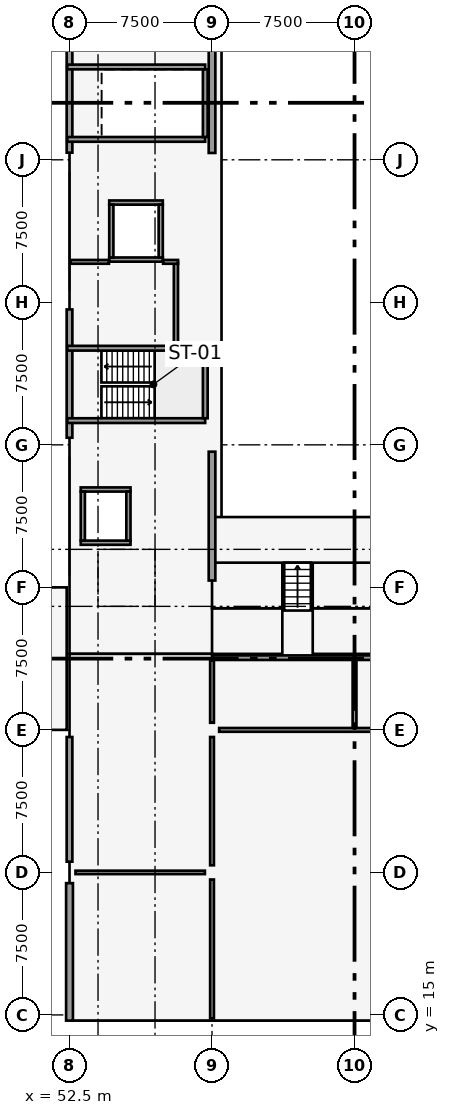
"""IFC4 building model, lengths in metres.
Left out: names, types, materials, properties, quantities, classifications, styles, units other than length and angle.
Written with IfcOpenShell. Run it as: python <this file> out.ifc"""

import sys

from ifc_helpers import new_model, si_unit, direction, frame, frame_2d, origin, origin_2d, place, context, subcontext, project, spatial, rectangle, extrude, element, fill, save


model = new_model("IFC4")
c1 = context("Model", 3, precision=1e-05, world=origin(), true_north=direction((0.0, 1.0)))
c2 = subcontext(c1, "Body", "Model", "MODEL_VIEW")
j1 = project(units=[si_unit("LENGTHUNIT", "METRE"), si_unit("PLANEANGLEUNIT", "RADIAN")], contexts=[c1])
p1 = place(None, origin())
s1 = spatial("IfcSite", under=j1, at=p1, CompositionType="ELEMENT")
p2 = place(p1, origin())
s2 = spatial("IfcBuilding", under=s1, at=p2, CompositionType="ELEMENT")
p3 = place(p2, frame((0.0, 0.0, 13.2)))
s3 = spatial("IfcBuildingStorey", under=s2, at=p3, CompositionType="ELEMENT", Elevation=13.2)
p4 = place(p3, frame((52.5, 22.5, 0.0), z_axis=(0.0, 0.0, 1.0), x_axis=(1.0, 0.0, 0.0)))
e1 = element("IfcColumn", 1, at=p4, inside=s3, PredefinedType="COLUMN", context=c2, shape_type="SweptSolid", body=[
    extrude(rectangle(XDim=0.6, YDim=1.1, at=origin_2d()), origin(), (0.0, 0.0, 1.0), 3.9),
])
for number, where, z_axis, x_axis in (
    (2, (52.5, 30.0, 0.0), (0.0, 0.0, 1.0), (1.0, 0.0, 0.0)),
    (3, (52.5, 37.5, 0.0), (0.0, 0.0, 1.0), (1.0, 0.0, 0.0)),
    (4, (52.5, 45.0, 0.0), (0.0, 0.0, 1.0), (1.0, 0.0, 0.0)),
    (5, (52.5, 52.5, 0.0), (0.0, 0.0, 1.0), (1.0, 0.0, 0.0)),
    (6, (52.5, 60.0, 0.0), (0.0, 0.0, 1.0), (1.0, 0.0, 0.0)),
    (7, (60.0, 22.5, 0.0), (0.0, 0.0, 1.0), (1.0, 0.0, 0.0)),
    (8, (60.0, 30.0, 0.0), (0.0, 0.0, 1.0), (1.0, 0.0, 0.0)),
    (9, (60.0, 37.5, 0.0), (0.0, 0.0, 1.0), (1.0, 0.0, 0.0)),
    (10, (60.0, 45.0, 0.0), (0.0, 0.0, 1.0), (1.0, 0.0, 0.0)),
    (11, (60.0, 52.5, 0.0), (0.0, 0.0, 1.0), (1.0, 0.0, 0.0)),
    (12, (60.0, 60.0, 0.0), (0.0, 0.0, 1.0), (1.0, 0.0, 0.0)),
):
    element("IfcColumn", number, at=place(p3, frame(where, z_axis=z_axis, x_axis=x_axis)), inside=s3, PredefinedType="COLUMN", context=c2, shape_type="SweptSolid", body=[
        extrude(rectangle(XDim=0.72, YDim=0.72, at=origin_2d()), origin(), (0.0, 0.0, 1.0), 3.9),
    ])
p5 = place(p3, frame((60.0, 37.86, 0.0), z_axis=(0.0, 0.0, 1.0), x_axis=(0.0, 1.0, 0.0)))
e13 = element("IfcWall", 13, at=p5, inside=s3, PredefinedType="SHEAR", context=c2, shape_type="SweptSolid", body=[
    extrude(rectangle(XDim=6.78, YDim=0.35, at=frame_2d((3.39, 0.0))), origin(), (0.0, 0.0, 1.0), 2.42),
])
p6 = place(p3, frame((60.0, 60.36, 0.0), z_axis=(0.0, 0.0, 1.0), x_axis=(0.0, 1.0, 0.0)))
e14 = element("IfcWall", 14, at=p6, inside=s3, PredefinedType="SHEAR", context=c2, shape_type="SweptSolid", body=[
    extrude(rectangle(XDim=6.78, YDim=0.35, at=frame_2d((3.39, 0.0))), origin(), (0.0, 0.0, 1.0), 2.57),
])
p7 = place(p3, frame((52.5, 14.7, 0.0), z_axis=(0.0, 0.0, 1.0), x_axis=(0.0, 1.0, 0.0)))
e15 = element("IfcWall", 15, at=p7, inside=s3, PredefinedType="SOLIDWALL", context=c2, shape_type="SweptSolid", body=[
    extrude(rectangle(XDim=7.235, YDim=0.36, at=frame_2d((3.618, 0.0))), origin(), (0.0, 0.0, 1.0), 2.39),
])
p8 = place(p3, frame((52.5, 23.065, 0.0), z_axis=(0.0, 0.0, 1.0), x_axis=(0.0, 1.0, 0.0)))
e16 = element("IfcWall", 16, at=p8, inside=s3, PredefinedType="SOLIDWALL", context=c2, shape_type="SweptSolid", body=[
    extrude(rectangle(XDim=6.56, YDim=0.3, at=frame_2d((3.28, 0.0))), origin(), (0.0, 0.0, 1.0), 2.39),
])
p9 = place(p3, frame((52.5, 45.375, 0.0), z_axis=(0.0, 0.0, 1.0), x_axis=(0.0, 1.0, 0.0)))
e17 = element("IfcWall", 17, at=p9, inside=s3, PredefinedType="SOLIDWALL", context=c2, shape_type="SweptSolid", body=[
    extrude(rectangle(XDim=6.75, YDim=0.3, at=frame_2d((3.375, 0.0))), origin(), (0.0, 0.0, 1.0), 2.64),
])
p10 = place(p3, frame((52.5, 60.375, 0.0), z_axis=(0.0, 0.0, 1.0), x_axis=(0.0, 1.0, 0.0)))
e18 = element("IfcWall", 18, at=p10, inside=s3, PredefinedType="SOLIDWALL", context=c2, shape_type="SweptSolid", body=[
    extrude(rectangle(XDim=6.75, YDim=0.3, at=frame_2d((3.375, 0.0))), origin(), (0.0, 0.0, 1.0), 2.54),
])
p11 = place(p3, frame((52.38, 46.275, 0.0), z_axis=(0.0, 0.0, 1.0), x_axis=(1.0, 0.0, 0.0)))
e19 = element("IfcWall", 19, at=p11, inside=s3, PredefinedType="SOLIDWALL", context=c2, shape_type="SweptSolid", body=[
    extrude(rectangle(XDim=7.26, YDim=0.25, at=frame_2d((3.63, 0.0))), origin(), (0.0, 0.0, 1.0), 3.62),
])
p12 = place(p11, frame((0.62, 0.0, 0.0)))
e20 = element("IfcOpeningElement", 20, at=p12, cuts=e19, PredefinedType="OPENING", context=c2, shape_type="SweptSolid", body=[
    extrude(rectangle(XDim=1.1, YDim=2.15, at=frame_2d((0.55, 1.075))), frame((0.0, 0.135, 0.0), z_axis=(0.0, -1.0, 0.0), x_axis=(1.0, 0.0, 0.0)), (0.0, 0.0, 1.0), 0.27),
])
p13 = place(p3, frame((52.38, 50.085, 0.0), z_axis=(0.0, 0.0, 1.0), x_axis=(1.0, 0.0, 0.0)))
e21 = element("IfcWall", 21, at=p13, inside=s3, PredefinedType="SOLIDWALL", context=c2, shape_type="SweptSolid", body=[
    extrude(rectangle(XDim=7.26, YDim=0.25, at=frame_2d((3.63, 0.0))), origin(), (0.0, 0.0, 1.0), 3.62),
])
p14 = place(p13, frame((0.62, 0.0, 0.0)))
e22 = element("IfcOpeningElement", 22, at=p14, cuts=e21, PredefinedType="OPENING", context=c2, shape_type="SweptSolid", body=[
    extrude(rectangle(XDim=1.1, YDim=2.15, at=frame_2d((0.55, 1.075))), frame((0.0, 0.135, 0.0), z_axis=(0.0, -1.0, 0.0), x_axis=(1.0, 0.0, 0.0)), (0.0, 0.0, 1.0), 0.27),
])
p15 = place(p3, frame((59.645, 46.4, 0.0), z_axis=(0.0, 0.0, 1.0), x_axis=(0.0, 1.0, 0.0)))
e23 = element("IfcWall", 23, at=p15, inside=s3, PredefinedType="SOLIDWALL", context=c2, shape_type="SweptSolid", body=[
    extrude(rectangle(XDim=3.56, YDim=0.25, at=frame_2d((1.78, 0.0))), origin(), (0.0, 0.0, 1.0), 3.62),
])
p16 = place(p3, frame((52.38, 61.075, 0.0), z_axis=(0.0, 0.0, 1.0), x_axis=(1.0, 0.0, 0.0)))
e24 = element("IfcWall", 24, at=p16, inside=s3, PredefinedType="SOLIDWALL", context=c2, shape_type="SweptSolid", body=[
    extrude(rectangle(XDim=7.26, YDim=0.25, at=frame_2d((3.63, 0.0))), origin(), (0.0, 0.0, 1.0), 3.62),
])
p17 = place(p16, frame((0.62, 0.0, 0.0)))
e25 = element("IfcOpeningElement", 25, at=p17, cuts=e24, PredefinedType="OPENING", context=c2, shape_type="SweptSolid", body=[
    extrude(rectangle(XDim=1.1, YDim=2.15, at=frame_2d((0.55, 1.075))), frame((0.0, 0.135, 0.0), z_axis=(0.0, -1.0, 0.0), x_axis=(1.0, 0.0, 0.0)), (0.0, 0.0, 1.0), 0.27),
])
p18 = place(p3, frame((52.38, 64.885, 0.0), z_axis=(0.0, 0.0, 1.0), x_axis=(1.0, 0.0, 0.0)))
e26 = element("IfcWall", 26, at=p18, inside=s3, PredefinedType="SOLIDWALL", context=c2, shape_type="SweptSolid", body=[
    extrude(rectangle(XDim=7.26, YDim=0.25, at=frame_2d((3.63, 0.0))), origin(), (0.0, 0.0, 1.0), 3.62),
])
p19 = place(p18, frame((0.62, 0.0, 0.0)))
e27 = element("IfcOpeningElement", 27, at=p19, cuts=e26, PredefinedType="OPENING", context=c2, shape_type="SweptSolid", body=[
    extrude(rectangle(XDim=1.1, YDim=2.15, at=frame_2d((0.55, 1.075))), frame((0.0, 0.135, 0.0), z_axis=(0.0, -1.0, 0.0), x_axis=(1.0, 0.0, 0.0)), (0.0, 0.0, 1.0), 0.27),
])
p20 = place(p3, frame((59.645, 61.2, 0.0), z_axis=(0.0, 0.0, 1.0), x_axis=(0.0, 1.0, 0.0)))
e28 = element("IfcWall", 28, at=p20, inside=s3, PredefinedType="SOLIDWALL", context=c2, shape_type="SweptSolid", body=[
    extrude(rectangle(XDim=3.56, YDim=0.25, at=frame_2d((1.78, 0.0))), origin(), (0.0, 0.0, 1.0), 3.62),
])
for number, where, z_axis, x_axis in (
    (29, (53.09, 39.85, 0.0), (0.0, 0.0, 1.0), (1.0, 0.0, 0.0)),
    (30, (53.09, 42.65, 0.0), (0.0, 0.0, 1.0), (1.0, 0.0, 0.0)),
):
    element("IfcWall", number, at=place(p3, frame(where, z_axis=z_axis, x_axis=x_axis)), inside=s3, PredefinedType="SOLIDWALL", context=c2, shape_type="SweptSolid", body=[
        extrude(rectangle(XDim=2.62, YDim=0.22, at=frame_2d((1.31, 0.0))), origin(), (0.0, 0.0, 1.0), 3.62),
    ])
p21 = place(p3, frame((53.2, 39.96, 0.0), z_axis=(0.0, 0.0, 1.0), x_axis=(0.0, 1.0, 0.0)))
e31 = element("IfcWall", 31, at=p21, inside=s3, PredefinedType="SOLIDWALL", context=c2, shape_type="SweptSolid", body=[
    extrude(rectangle(XDim=2.58, YDim=0.22, at=frame_2d((1.29, 0.0))), origin(), (0.0, 0.0, 1.0), 3.62),
])
p22 = place(p3, frame((55.6, 39.96, 0.0), z_axis=(0.0, 0.0, 1.0), x_axis=(0.0, 1.0, 0.0)))
e32 = element("IfcWall", 32, at=p22, inside=s3, PredefinedType="SOLIDWALL", context=c2, shape_type="SweptSolid", body=[
    extrude(rectangle(XDim=2.58, YDim=0.22, at=frame_2d((1.29, 0.0))), origin(), (0.0, 0.0, 1.0), 3.62),
])
p23 = place(p22, frame((0.79, 0.0, 0.0)))
e33 = element("IfcOpeningElement", 33, at=p23, cuts=e32, PredefinedType="OPENING", context=c2, shape_type="SweptSolid", body=[
    extrude(rectangle(XDim=1.0, YDim=2.15, at=frame_2d((0.5, 1.075))), frame((0.0, 0.12, 0.0), z_axis=(0.0, -1.0, 0.0), x_axis=(1.0, 0.0, 0.0)), (0.0, 0.0, 1.0), 0.24),
])
p24 = place(p3, frame((54.59, 54.75, 0.0), z_axis=(0.0, 0.0, 1.0), x_axis=(1.0, 0.0, 0.0)))
e34 = element("IfcWall", 34, at=p24, inside=s3, PredefinedType="SOLIDWALL", context=c2, shape_type="SweptSolid", body=[
    extrude(rectangle(XDim=2.82, YDim=0.22, at=frame_2d((1.41, 0.0))), origin(), (0.0, 0.0, 1.0), 3.62),
])
p25 = place(p24, frame((0.86, 0.0, 0.0)))
e35 = element("IfcOpeningElement", 35, at=p25, cuts=e34, PredefinedType="OPENING", context=c2, shape_type="SweptSolid", body=[
    extrude(rectangle(XDim=1.1, YDim=2.15, at=frame_2d((0.55, 1.075))), frame((0.0, 0.12, 0.0), z_axis=(0.0, -1.0, 0.0), x_axis=(1.0, 0.0, 0.0)), (0.0, 0.0, 1.0), 0.24),
])
p26 = place(p3, frame((54.59, 57.75, 0.0), z_axis=(0.0, 0.0, 1.0), x_axis=(1.0, 0.0, 0.0)))
e36 = element("IfcWall", 36, at=p26, inside=s3, PredefinedType="SOLIDWALL", context=c2, shape_type="SweptSolid", body=[
    extrude(rectangle(XDim=2.82, YDim=0.22, at=frame_2d((1.41, 0.0))), origin(), (0.0, 0.0, 1.0), 3.62),
])
for number, where, z_axis, x_axis in (
    (37, (54.7, 54.86, 0.0), (0.0, 0.0, 1.0), (0.0, 1.0, 0.0)),
    (38, (57.3, 54.86, 0.0), (0.0, 0.0, 1.0), (0.0, 1.0, 0.0)),
):
    element("IfcWall", number, at=place(p3, frame(where, z_axis=z_axis, x_axis=x_axis)), inside=s3, PredefinedType="SOLIDWALL", context=c2, shape_type="SweptSolid", body=[
        extrude(rectangle(XDim=2.78, YDim=0.22, at=frame_2d((1.39, 0.0))), origin(), (0.0, 0.0, 1.0), 3.62),
    ])
p27 = place(p3, frame((58.1, 50.22, 0.0), z_axis=(0.0, 0.0, 1.0), x_axis=(0.0, 1.0, 0.0)))
e39 = element("IfcWall", 39, at=p27, inside=s3, PredefinedType="SOLIDWALL", context=c2, shape_type="SweptSolid", body=[
    extrude(rectangle(XDim=4.41, YDim=0.22, at=frame_2d((2.205, 0.0))), origin(), (0.0, 0.0, 1.0), 3.62),
])
p28 = place(p27, frame((0.45, 0.0, 0.0)))
e40 = element("IfcOpeningElement", 40, at=p28, cuts=e39, PredefinedType="OPENING", context=c2, shape_type="SweptSolid", body=[
    extrude(rectangle(XDim=1.1, YDim=2.15, at=frame_2d((0.55, 1.075))), frame((0.0, 0.12, 0.0), z_axis=(0.0, -1.0, 0.0), x_axis=(1.0, 0.0, 0.0)), (0.0, 0.0, 1.0), 0.24),
])
p29 = place(p3, frame((52.56, 54.63, 0.0), z_axis=(0.0, 0.0, 1.0), x_axis=(1.0, 0.0, 0.0)))
e41 = element("IfcWall", 41, at=p29, inside=s3, PredefinedType="PARTITIONING", context=c2, shape_type="SweptSolid", body=[
    extrude(rectangle(XDim=2.015, YDim=0.2, at=frame_2d((1.007, 0.0))), origin(), (0.0, 0.0, 1.0), 3.0),
])
p30 = place(p3, frame((57.425, 54.63, 0.0), z_axis=(0.0, 0.0, 1.0), x_axis=(1.0, 0.0, 0.0)))
e42 = element("IfcWall", 42, at=p30, inside=s3, PredefinedType="PARTITIONING", context=c2, shape_type="SweptSolid", body=[
    extrude(rectangle(XDim=0.785, YDim=0.2, at=frame_2d((0.393, 0.0))), origin(), (0.0, 0.0, 1.0), 3.6),
])
p31 = place(p3, frame((52.814, 22.5, 0.0), z_axis=(0.0, 0.0, 1.0), x_axis=(1.0, 0.0, 0.0)))
e43 = element("IfcWall", 43, at=p31, inside=s3, PredefinedType="PARTITIONING", context=c2, shape_type="SweptSolid", body=[
    extrude(rectangle(XDim=6.812, YDim=0.18, at=frame_2d((3.406, 0.0))), origin(), (0.0, 0.0, 1.0), 2.39),
])
p32 = place(p31, frame((2.786, 0.0, 0.0)))
e44 = element("IfcOpeningElement", 44, at=p32, cuts=e43, PredefinedType="OPENING", context=c2, shape_type="SweptSolid", body=[
    extrude(rectangle(XDim=1.3, YDim=2.15, at=frame_2d((0.65, 1.075))), frame((0.0, 0.1, 0.0), z_axis=(0.0, -1.0, 0.0), x_axis=(1.0, 0.0, 0.0)), (0.0, 0.0, 1.0), 0.2),
])
p33 = place(p3, frame((60.374, 30.0, 0.0), z_axis=(0.0, 0.0, 1.0), x_axis=(1.0, 0.0, 0.0)))
e45 = element("IfcWall", 45, at=p33, inside=s3, PredefinedType="PARTITIONING", context=c2, shape_type="SweptSolid", body=[
    extrude(rectangle(XDim=14.252, YDim=0.2, at=frame_2d((7.126, 0.0))), origin(), (0.0, 0.0, 1.0), 2.39),
])
p34 = place(p33, frame((2.626, 0.0, 0.0)))
e46 = element("IfcOpeningElement", 46, at=p34, cuts=e45, PredefinedType="OPENING", context=c2, shape_type="SweptSolid", body=[
    extrude(rectangle(XDim=1.5, YDim=2.16, at=frame_2d((0.75, 1.08))), frame((0.0, 0.11, 0.0), z_axis=(0.0, -1.0, 0.0), x_axis=(1.0, 0.0, 0.0)), (0.0, 0.0, 1.0), 0.22),
])
p35 = place(p3, frame((60.0, 33.8, 0.0), z_axis=(0.0, 0.0, 1.0), x_axis=(1.0, 0.0, 0.0)))
e47 = element("IfcWall", 47, at=p35, inside=s3, PredefinedType="PARTITIONING", context=c2, shape_type="SweptSolid", body=[
    extrude(rectangle(XDim=37.5, YDim=0.24, at=frame_2d((18.75, 0.0))), origin(), (0.0, 0.0, 1.0), 2.39),
])
p36 = place(p35, frame((2.95, 0.0, 0.0)))
e48 = element("IfcOpeningElement", 48, at=p36, cuts=e47, PredefinedType="OPENING", context=c2, shape_type="SweptSolid", body=[
    extrude(rectangle(XDim=1.6, YDim=2.16, at=frame_2d((0.8, 1.08))), frame((0.0, 0.13, 0.0), z_axis=(0.0, -1.0, 0.0), x_axis=(1.0, 0.0, 0.0)), (0.0, 0.0, 1.0), 0.26),
])
p37 = place(p35, frame((32.95, 0.0, 0.0)))
e49 = element("IfcOpeningElement", 49, at=p37, cuts=e47, PredefinedType="OPENING", context=c2, shape_type="SweptSolid", body=[
    extrude(rectangle(XDim=1.6, YDim=2.16, at=frame_2d((0.8, 1.08))), frame((0.0, 0.13, 0.0), z_axis=(0.0, -1.0, 0.0), x_axis=(1.0, 0.0, 0.0)), (0.0, 0.0, 1.0), 0.26),
])
p38 = place(p3, frame((67.5, 30.114, 0.0), z_axis=(0.0, 0.0, 1.0), x_axis=(0.0, 1.0, 0.0)))
e50 = element("IfcWall", 50, at=p38, inside=s3, PredefinedType="PARTITIONING", context=c2, shape_type="SweptSolid", body=[
    extrude(rectangle(XDim=3.552, YDim=0.2, at=frame_2d((1.776, 0.0))), origin(), (0.0, 0.0, 1.0), 2.59),
])
p39 = place(p3, frame((60.0, 14.82, 0.0), z_axis=(0.0, 0.0, 1.0), x_axis=(0.0, 1.0, 0.0)))
e51 = element("IfcWall", 51, at=p39, inside=s3, PredefinedType="PARTITIONING", context=c2, shape_type="SweptSolid", body=[
    extrude(rectangle(XDim=7.306, YDim=0.2, at=frame_2d((3.653, 0.0))), origin(), (0.0, 0.0, 1.0), 2.39),
])
p40 = place(p3, frame((60.0, 22.874, 0.0), z_axis=(0.0, 0.0, 1.0), x_axis=(0.0, 1.0, 0.0)))
e52 = element("IfcWall", 52, at=p40, inside=s3, PredefinedType="PARTITIONING", context=c2, shape_type="SweptSolid", body=[
    extrude(rectangle(XDim=6.752, YDim=0.2, at=frame_2d((3.376, 0.0))), origin(), (0.0, 0.0, 1.0), 2.39),
])
p41 = place(p40, frame((2.576, 0.0, 0.0)))
e53 = element("IfcOpeningElement", 53, at=p41, cuts=e52, PredefinedType="OPENING", context=c2, shape_type="SweptSolid", body=[
    extrude(rectangle(XDim=1.6, YDim=2.15, at=frame_2d((0.8, 1.075))), frame((0.0, 0.11, 0.0), z_axis=(0.0, -1.0, 0.0), x_axis=(1.0, 0.0, 0.0)), (0.0, 0.0, 1.0), 0.22),
])
p42 = place(p3, frame((60.0, 30.374, 0.0), z_axis=(0.0, 0.0, 1.0), x_axis=(0.0, 1.0, 0.0)))
e54 = element("IfcWall", 54, at=p42, inside=s3, PredefinedType="PARTITIONING", context=c2, shape_type="SweptSolid", body=[
    extrude(rectangle(XDim=3.292, YDim=0.2, at=frame_2d((1.646, 0.0))), origin(), (0.0, 0.0, 1.0), 2.39),
])
p43 = place(p42, frame((0.726, 0.0, 0.0)))
e55 = element("IfcOpeningElement", 55, at=p43, cuts=e54, PredefinedType="OPENING", context=c2, shape_type="SweptSolid", body=[
    extrude(rectangle(XDim=1.6, YDim=2.16, at=frame_2d((0.8, 1.08))), frame((0.0, 0.11, 0.0), z_axis=(0.0, -1.0, 0.0), x_axis=(1.0, 0.0, 0.0)), (0.0, 0.0, 1.0), 0.22),
])
p44 = place(p12, origin())
e56 = element("IfcDoor", 56, at=p44, inside=s3, OperationType="SINGLE_SWING_LEFT", PredefinedType="DOOR", context=c2, shape_type="SweptSolid", body=[
    extrude(rectangle(XDim=1.1, YDim=2.15, at=frame_2d((0.55, 1.075))), frame((0.0, 0.025, 0.0), z_axis=(0.0, -1.0, 0.0), x_axis=(1.0, 0.0, 0.0)), (0.0, 0.0, 1.0), 0.05),
])
fill(e20, e56)
p45 = place(p14, frame((1.1, 0.0, 0.0), z_axis=(0.0, 0.0, 1.0), x_axis=(-1.0, 0.0, 0.0)))
e57 = element("IfcDoor", 57, at=p45, inside=s3, OperationType="SINGLE_SWING_RIGHT", PredefinedType="DOOR", context=c2, shape_type="SweptSolid", body=[
    extrude(rectangle(XDim=1.1, YDim=2.15, at=frame_2d((0.55, 1.075))), frame((0.0, 0.025, 0.0), z_axis=(0.0, -1.0, 0.0), x_axis=(1.0, 0.0, 0.0)), (0.0, 0.0, 1.0), 0.05),
])
fill(e22, e57)
p46 = place(p17, origin())
e58 = element("IfcDoor", 58, at=p46, inside=s3, OperationType="SINGLE_SWING_LEFT", PredefinedType="DOOR", context=c2, shape_type="SweptSolid", body=[
    extrude(rectangle(XDim=1.1, YDim=2.15, at=frame_2d((0.55, 1.075))), frame((0.0, 0.025, 0.0), z_axis=(0.0, -1.0, 0.0), x_axis=(1.0, 0.0, 0.0)), (0.0, 0.0, 1.0), 0.05),
])
fill(e25, e58)
p47 = place(p19, frame((1.1, 0.0, 0.0), z_axis=(0.0, 0.0, 1.0), x_axis=(-1.0, 0.0, 0.0)))
e59 = element("IfcDoor", 59, at=p47, inside=s3, OperationType="SINGLE_SWING_RIGHT", PredefinedType="DOOR", context=c2, shape_type="SweptSolid", body=[
    extrude(rectangle(XDim=1.1, YDim=2.15, at=frame_2d((0.55, 1.075))), frame((0.0, 0.025, 0.0), z_axis=(0.0, -1.0, 0.0), x_axis=(1.0, 0.0, 0.0)), (0.0, 0.0, 1.0), 0.05),
])
fill(e27, e59)
p48 = place(p23, origin())
e60 = element("IfcDoor", 60, at=p48, inside=s3, OperationType="SLIDING_TO_LEFT", PredefinedType="DOOR", context=c2, shape_type="SweptSolid", body=[
    extrude(rectangle(XDim=1.0, YDim=2.15, at=frame_2d((0.5, 1.075))), frame((0.0, 0.025, 0.0), z_axis=(0.0, -1.0, 0.0), x_axis=(1.0, 0.0, 0.0)), (0.0, 0.0, 1.0), 0.05),
])
fill(e33, e60)
p49 = place(p25, origin())
e61 = element("IfcDoor", 61, at=p49, inside=s3, OperationType="SLIDING_TO_LEFT", PredefinedType="DOOR", context=c2, shape_type="SweptSolid", body=[
    extrude(rectangle(XDim=1.1, YDim=2.15, at=frame_2d((0.55, 1.075))), frame((0.0, 0.025, 0.0), z_axis=(0.0, -1.0, 0.0), x_axis=(1.0, 0.0, 0.0)), (0.0, 0.0, 1.0), 0.05),
])
fill(e35, e61)
p50 = place(p28, origin())
e62 = element("IfcDoor", 62, at=p50, inside=s3, OperationType="SINGLE_SWING_LEFT", PredefinedType="DOOR", context=c2, shape_type="SweptSolid", body=[
    extrude(rectangle(XDim=1.1, YDim=2.15, at=frame_2d((0.55, 1.075))), frame((0.0, 0.025, 0.0), z_axis=(0.0, -1.0, 0.0), x_axis=(1.0, 0.0, 0.0)), (0.0, 0.0, 1.0), 0.05),
])
fill(e40, e62)
p51 = place(p32, origin())
e63 = element("IfcDoor", 63, at=p51, inside=s3, OperationType="SINGLE_SWING_RIGHT", PredefinedType="DOOR", context=c2, shape_type="SweptSolid", body=[
    extrude(rectangle(XDim=1.3, YDim=2.15, at=frame_2d((0.65, 1.075))), frame((0.0, 0.025, 0.0), z_axis=(0.0, -1.0, 0.0), x_axis=(1.0, 0.0, 0.0)), (0.0, 0.0, 1.0), 0.05),
])
fill(e44, e63)
p52 = place(p34, origin())
e64 = element("IfcDoor", 64, at=p52, inside=s3, OperationType="SINGLE_SWING_RIGHT", PredefinedType="DOOR", context=c2, shape_type="SweptSolid", body=[
    extrude(rectangle(XDim=1.5, YDim=2.16, at=frame_2d((0.75, 1.08))), frame((0.0, 0.025, 0.0), z_axis=(0.0, -1.0, 0.0), x_axis=(1.0, 0.0, 0.0)), (0.0, 0.0, 1.0), 0.05),
])
fill(e46, e64)
p53 = place(p36, origin())
e65 = element("IfcDoor", 65, at=p53, inside=s3, OperationType="SINGLE_SWING_RIGHT", PredefinedType="DOOR", context=c2, shape_type="SweptSolid", body=[
    extrude(rectangle(XDim=1.6, YDim=2.16, at=frame_2d((0.8, 1.08))), frame((0.0, 0.025, 0.0), z_axis=(0.0, -1.0, 0.0), x_axis=(1.0, 0.0, 0.0)), (0.0, 0.0, 1.0), 0.05),
])
fill(e48, e65)
p54 = place(p41, origin())
e66 = element("IfcDoor", 66, at=p54, inside=s3, OperationType="SINGLE_SWING_RIGHT", PredefinedType="DOOR", context=c2, shape_type="SweptSolid", body=[
    extrude(rectangle(XDim=1.6, YDim=2.15, at=frame_2d((0.8, 1.075))), frame((0.0, 0.025, 0.0), z_axis=(0.0, -1.0, 0.0), x_axis=(1.0, 0.0, 0.0)), (0.0, 0.0, 1.0), 0.05),
])
fill(e53, e66)
p55 = place(p43, origin())
e67 = element("IfcDoor", 67, at=p55, inside=s3, OperationType="SINGLE_SWING_LEFT", PredefinedType="DOOR", context=c2, shape_type="SweptSolid", body=[
    extrude(rectangle(XDim=1.6, YDim=2.16, at=frame_2d((0.8, 1.08))), frame((0.0, 0.025, 0.0), z_axis=(0.0, -1.0, 0.0), x_axis=(1.0, 0.0, 0.0)), (0.0, 0.0, 1.0), 0.05),
])
fill(e55, e67)
save(model, sys.argv[1])
